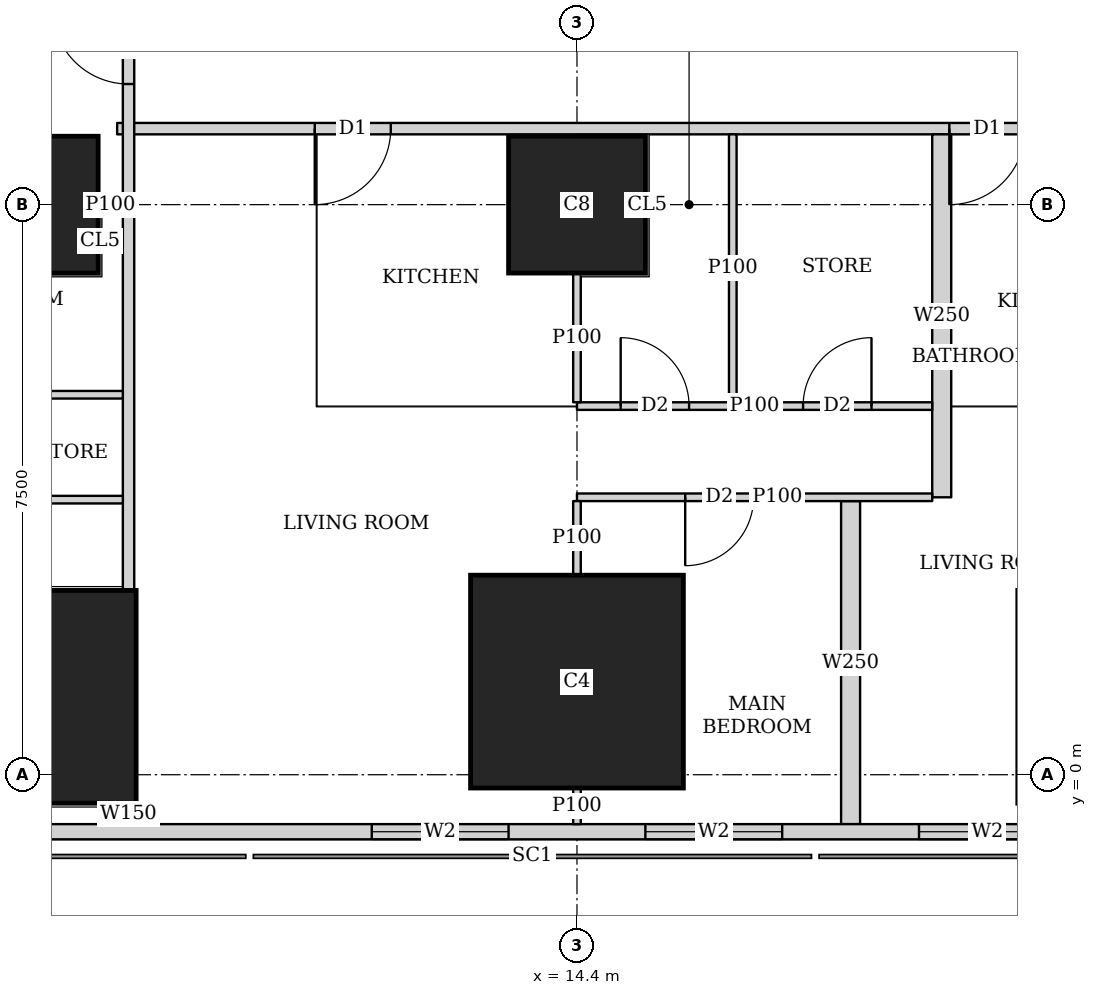
"""IFC4 building model, lengths in metres.
Left out: names, types, materials, properties, quantities, classifications, styles, units other than length and angle.
Written with IfcOpenShell. Run it as: python <this file> out.ifc"""

import sys

from ifc_helpers import new_model, si_unit, direction, frame, frame_2d, origin, origin_2d, place, context, subcontext, project, spatial, rectangle, extrude, element, fill, save


model = new_model("IFC4")
c1 = context("Model", 3, precision=1e-05, world=origin(), true_north=direction((0.0, 1.0)))
c2 = subcontext(c1, "Body", "Model", "MODEL_VIEW")
j1 = project(units=[si_unit("LENGTHUNIT", "METRE"), si_unit("PLANEANGLEUNIT", "RADIAN")], contexts=[c1])
p1 = place(None, origin())
s1 = spatial("IfcSite", under=j1, at=p1, CompositionType="ELEMENT")
p2 = place(p1, origin())
s2 = spatial("IfcBuilding", under=s1, at=p2, CompositionType="ELEMENT")
p3 = place(p2, frame((0.0, 0.0, 68.75)))
s3 = spatial("IfcBuildingStorey", under=s2, at=p3, CompositionType="ELEMENT", Elevation=68.75)
for number, where, z_axis, x_axis in (
    (1, (7.2, 1.025, 0.0), (0.0, 0.0, 1.0), (1.0, 0.0, 0.0)),
    (2, (14.4, 1.225, 0.0), (0.0, 0.0, 1.0), (1.0, 0.0, 0.0)),
):
    element("IfcColumn", number, at=place(p3, frame(where, z_axis=z_axis, x_axis=x_axis)), inside=s3, PredefinedType="COLUMN", context=c2, shape_type="SweptSolid", body=[
        extrude(rectangle(XDim=2.8, YDim=2.8, at=origin_2d()), origin(), (0.0, 0.0, 1.0), 3.75),
    ])
for number, where, z_axis, x_axis in (
    (3, (7.2, 7.5, 0.0), (0.0, 0.0, 1.0), (1.0, 0.0, 0.0)),
    (4, (14.4, 7.5, 0.0), (0.0, 0.0, 1.0), (1.0, 0.0, 0.0)),
):
    element("IfcColumn", number, at=place(p3, frame(where, z_axis=z_axis, x_axis=x_axis)), inside=s3, PredefinedType="COLUMN", context=c2, shape_type="SweptSolid", body=[
        extrude(rectangle(XDim=1.8, YDim=1.8, at=origin_2d()), origin(), (0.0, 0.0, 1.0), 3.75),
    ])
p4 = place(p3, frame((2.163, -0.75, 0.0), z_axis=(0.0, 0.0, 1.0), x_axis=(1.0, 0.0, 0.0)))
e5 = element("IfcWall", 5, at=p4, inside=s3, PredefinedType="SOLIDWALL", context=c2, shape_type="SweptSolid", body=[
    extrude(rectangle(XDim=45.628, YDim=0.2, at=frame_2d((22.814, 0.0))), origin(), (0.0, 0.0, 1.0), 3.45),
])
p5 = place(p4, frame((9.537, 0.0, 0.9)))
e6 = element("IfcOpeningElement", 6, at=p5, cuts=e5, PredefinedType="OPENING", context=c2, shape_type="SweptSolid", body=[
    extrude(rectangle(XDim=1.8, YDim=1.5, at=frame_2d((0.9, 0.75))), frame((0.0, 0.11, 0.0), z_axis=(0.0, -1.0, 0.0), x_axis=(1.0, 0.0, 0.0)), (0.0, 0.0, 1.0), 0.22),
])
p6 = place(p4, frame((13.137, 0.0, 0.9)))
e7 = element("IfcOpeningElement", 7, at=p6, cuts=e5, PredefinedType="OPENING", context=c2, shape_type="SweptSolid", body=[
    extrude(rectangle(XDim=1.8, YDim=1.5, at=frame_2d((0.9, 0.75))), frame((0.0, 0.11, 0.0), z_axis=(0.0, -1.0, 0.0), x_axis=(1.0, 0.0, 0.0)), (0.0, 0.0, 1.0), 0.22),
])
p7 = place(p4, frame((16.737, 0.0, 0.9)))
e8 = element("IfcOpeningElement", 8, at=p7, cuts=e5, PredefinedType="OPENING", context=c2, shape_type="SweptSolid", body=[
    extrude(rectangle(XDim=1.8, YDim=1.5, at=frame_2d((0.9, 0.75))), frame((0.0, 0.11, 0.0), z_axis=(0.0, -1.0, 0.0), x_axis=(1.0, 0.0, 0.0)), (0.0, 0.0, 1.0), 0.22),
])
p8 = place(p4, frame((20.337, 0.0, 0.9)))
e9 = element("IfcOpeningElement", 9, at=p8, cuts=e5, PredefinedType="OPENING", context=c2, shape_type="SweptSolid", body=[
    extrude(rectangle(XDim=1.8, YDim=1.5, at=frame_2d((0.9, 0.75))), frame((0.0, 0.11, 0.0), z_axis=(0.0, -1.0, 0.0), x_axis=(1.0, 0.0, 0.0)), (0.0, 0.0, 1.0), 0.22),
])
p9 = place(p4, frame((23.937, 0.0, 0.9)))
e10 = element("IfcOpeningElement", 10, at=p9, cuts=e5, PredefinedType="OPENING", context=c2, shape_type="SweptSolid", body=[
    extrude(rectangle(XDim=1.8, YDim=1.5, at=frame_2d((0.9, 0.75))), frame((0.0, 0.11, 0.0), z_axis=(0.0, -1.0, 0.0), x_axis=(1.0, 0.0, 0.0)), (0.0, 0.0, 1.0), 0.22),
])
p10 = place(p4, frame((27.537, 0.0, 0.9)))
e11 = element("IfcOpeningElement", 11, at=p10, cuts=e5, PredefinedType="OPENING", context=c2, shape_type="SweptSolid", body=[
    extrude(rectangle(XDim=1.8, YDim=1.5, at=frame_2d((0.9, 0.75))), frame((0.0, 0.11, 0.0), z_axis=(0.0, -1.0, 0.0), x_axis=(1.0, 0.0, 0.0)), (0.0, 0.0, 1.0), 0.22),
])
p11 = place(p4, frame((31.137, 0.0, 0.9)))
e12 = element("IfcOpeningElement", 12, at=p11, cuts=e5, PredefinedType="OPENING", context=c2, shape_type="SweptSolid", body=[
    extrude(rectangle(XDim=1.8, YDim=1.5, at=frame_2d((0.9, 0.75))), frame((0.0, 0.11, 0.0), z_axis=(0.0, -1.0, 0.0), x_axis=(1.0, 0.0, 0.0)), (0.0, 0.0, 1.0), 0.22),
])
p12 = place(p4, frame((34.737, 0.0, 0.9)))
e13 = element("IfcOpeningElement", 13, at=p12, cuts=e5, PredefinedType="OPENING", context=c2, shape_type="SweptSolid", body=[
    extrude(rectangle(XDim=1.8, YDim=1.5, at=frame_2d((0.9, 0.75))), frame((0.0, 0.11, 0.0), z_axis=(0.0, -1.0, 0.0), x_axis=(1.0, 0.0, 0.0)), (0.0, 0.0, 1.0), 0.22),
])
p13 = place(p3, frame((8.5, -0.65, 0.0), z_axis=(0.0, 0.0, 1.0), x_axis=(0.0, 1.0, 0.0)))
e14 = element("IfcWall", 14, at=p13, inside=s3, PredefinedType="SOLIDWALL", context=c2, shape_type="SweptSolid", body=[
    extrude(rectangle(XDim=0.274, YDim=0.15, at=frame_2d((0.137, 0.0))), origin(), (0.0, 0.0, 1.0), 3.45),
])
p14 = place(p3, frame((8.5, 2.426, 0.0), z_axis=(0.0, 0.0, 1.0), x_axis=(0.0, 1.0, 0.0)))
e15 = element("IfcWall", 15, at=p14, inside=s3, PredefinedType="SOLIDWALL", context=c2, shape_type="SweptSolid", body=[
    extrude(rectangle(XDim=40.173, YDim=0.15, at=frame_2d((20.086, 0.0))), origin(), (0.0, 0.0, 1.0), 3.45),
])
p15 = place(p14, frame((6.661, 0.0, 0.0)))
e16 = element("IfcOpeningElement", 16, at=p15, cuts=e15, PredefinedType="OPENING", context=c2, shape_type="SweptSolid", body=[
    extrude(rectangle(XDim=1.0, YDim=2.1, at=frame_2d((0.5, 1.05))), frame((0.0, 0.085, 0.0), z_axis=(0.0, -1.0, 0.0), x_axis=(1.0, 0.0, 0.0)), (0.0, 0.0, 1.0), 0.17),
])
p16 = place(p14, frame((9.986, 0.0, 0.0)))
e17 = element("IfcOpeningElement", 17, at=p16, cuts=e15, PredefinedType="OPENING", context=c2, shape_type="SweptSolid", body=[
    extrude(rectangle(XDim=1.0, YDim=2.1, at=frame_2d((0.5, 1.05))), frame((0.0, 0.085, 0.0), z_axis=(0.0, -1.0, 0.0), x_axis=(1.0, 0.0, 0.0)), (0.0, 0.0, 1.0), 0.17),
])
p17 = place(p14, frame((17.487, 0.0, 0.0)))
e18 = element("IfcOpeningElement", 18, at=p17, cuts=e15, PredefinedType="OPENING", context=c2, shape_type="SweptSolid", body=[
    extrude(rectangle(XDim=1.0, YDim=2.1, at=frame_2d((0.5, 1.05))), frame((0.0, 0.085, 0.0), z_axis=(0.0, -1.0, 0.0), x_axis=(1.0, 0.0, 0.0)), (0.0, 0.0, 1.0), 0.17),
])
p18 = place(p14, frame((24.987, 0.0, 0.0)))
e19 = element("IfcOpeningElement", 19, at=p18, cuts=e15, PredefinedType="OPENING", context=c2, shape_type="SweptSolid", body=[
    extrude(rectangle(XDim=1.0, YDim=2.1, at=frame_2d((0.5, 1.05))), frame((0.0, 0.085, 0.0), z_axis=(0.0, -1.0, 0.0), x_axis=(1.0, 0.0, 0.0)), (0.0, 0.0, 1.0), 0.17),
])
p19 = place(p3, frame((40.054, 8.5, 0.0), z_axis=(0.0, 0.0, 1.0), x_axis=(-1.0, 0.0, 0.0)))
e20 = element("IfcWall", 20, at=p19, inside=s3, PredefinedType="SOLIDWALL", context=c2, shape_type="SweptSolid", body=[
    extrude(rectangle(XDim=31.704, YDim=0.15, at=frame_2d((15.852, 0.0))), origin(), (0.0, 0.0, 1.0), 3.45),
])
p20 = place(p19, frame((28.104, 0.0, 0.0)))
e21 = element("IfcOpeningElement", 21, at=p20, cuts=e20, PredefinedType="OPENING", context=c2, shape_type="SweptSolid", body=[
    extrude(rectangle(XDim=1.0, YDim=2.1, at=frame_2d((0.5, 1.05))), frame((0.0, 0.085, 0.0), z_axis=(0.0, -1.0, 0.0), x_axis=(1.0, 0.0, 0.0)), (0.0, 0.0, 1.0), 0.17),
])
p21 = place(p19, frame((19.755, 0.0, 0.0)))
e22 = element("IfcOpeningElement", 22, at=p21, cuts=e20, PredefinedType="OPENING", context=c2, shape_type="SweptSolid", body=[
    extrude(rectangle(XDim=1.0, YDim=2.1, at=frame_2d((0.5, 1.05))), frame((0.0, 0.085, 0.0), z_axis=(0.0, -1.0, 0.0), x_axis=(1.0, 0.0, 0.0)), (0.0, 0.0, 1.0), 0.17),
])
p22 = place(p19, frame((12.555, 0.0, 0.0)))
e23 = element("IfcOpeningElement", 23, at=p22, cuts=e20, PredefinedType="OPENING", context=c2, shape_type="SweptSolid", body=[
    extrude(rectangle(XDim=1.0, YDim=2.1, at=frame_2d((0.5, 1.05))), frame((0.0, 0.085, 0.0), z_axis=(0.0, -1.0, 0.0), x_axis=(1.0, 0.0, 0.0)), (0.0, 0.0, 1.0), 0.17),
])
p23 = place(p19, frame((5.355, 0.0, 0.0)))
e24 = element("IfcOpeningElement", 24, at=p23, cuts=e20, PredefinedType="OPENING", context=c2, shape_type="SweptSolid", body=[
    extrude(rectangle(XDim=1.0, YDim=2.1, at=frame_2d((0.5, 1.05))), frame((0.0, 0.085, 0.0), z_axis=(0.0, -1.0, 0.0), x_axis=(1.0, 0.0, 0.0)), (0.0, 0.0, 1.0), 0.17),
])
p24 = place(p3, frame((4.9, 4.999, 0.0), z_axis=(0.0, 0.0, 1.0), x_axis=(1.0, 0.0, 0.0)))
e25 = element("IfcWall", 25, at=p24, inside=s3, PredefinedType="PARTITIONING", context=c2, shape_type="SweptSolid", body=[
    extrude(rectangle(XDim=3.525, YDim=0.1, at=frame_2d((1.763, 0.0))), origin(), (0.0, 0.0, 1.0), 3.45),
])
p25 = place(p24, frame((1.325, 0.0, 0.0)))
e26 = element("IfcOpeningElement", 26, at=p25, cuts=e25, PredefinedType="OPENING", context=c2, shape_type="SweptSolid", body=[
    extrude(rectangle(XDim=0.9, YDim=2.1, at=frame_2d((0.45, 1.05))), frame((0.0, 0.06, 0.0), z_axis=(0.0, -1.0, 0.0), x_axis=(1.0, 0.0, 0.0)), (0.0, 0.0, 1.0), 0.12),
])
p26 = place(p3, frame((8.101, 7.5, 0.0), z_axis=(0.0, 0.0, 1.0), x_axis=(1.0, 0.0, 0.0)))
e27 = element("IfcWall", 27, at=p26, inside=s3, PredefinedType="PARTITIONING", context=c2, shape_type="SweptSolid", body=[
    extrude(rectangle(XDim=0.324, YDim=0.1, at=frame_2d((0.162, 0.0))), origin(), (0.0, 0.0, 1.0), 3.45),
])
p27 = place(p3, frame((19.074, 3.65, 0.0), z_axis=(0.0, 0.0, 1.0), x_axis=(-1.0, 0.0, 0.0)))
e28 = element("IfcWall", 28, at=p27, inside=s3, PredefinedType="PARTITIONING", context=c2, shape_type="SweptSolid", body=[
    extrude(rectangle(XDim=4.674, YDim=0.1, at=frame_2d((2.337, 0.0))), origin(), (0.0, 0.0, 1.0), 3.45),
])
p28 = place(p27, frame((2.35, 0.0, 0.0)))
e29 = element("IfcOpeningElement", 29, at=p28, cuts=e28, PredefinedType="OPENING", context=c2, shape_type="SweptSolid", body=[
    extrude(rectangle(XDim=0.9, YDim=2.1, at=frame_2d((0.45, 1.05))), frame((0.0, 0.06, 0.0), z_axis=(0.0, -1.0, 0.0), x_axis=(1.0, 0.0, 0.0)), (0.0, 0.0, 1.0), 0.12),
])
p29 = place(p3, frame((19.074, 4.85, 0.0), z_axis=(0.0, 0.0, 1.0), x_axis=(-1.0, 0.0, 0.0)))
e30 = element("IfcWall", 30, at=p29, inside=s3, PredefinedType="PARTITIONING", context=c2, shape_type="SweptSolid", body=[
    extrude(rectangle(XDim=4.674, YDim=0.1, at=frame_2d((2.337, 0.0))), origin(), (0.0, 0.0, 1.0), 3.45),
])
p30 = place(p29, frame((3.199, 0.0, 0.0)))
e31 = element("IfcOpeningElement", 31, at=p30, cuts=e30, PredefinedType="OPENING", context=c2, shape_type="SweptSolid", body=[
    extrude(rectangle(XDim=0.9, YDim=2.1, at=frame_2d((0.45, 1.05))), frame((0.0, 0.06, 0.0), z_axis=(0.0, -1.0, 0.0), x_axis=(1.0, 0.0, 0.0)), (0.0, 0.0, 1.0), 0.12),
])
p31 = place(p29, frame((0.799, 0.0, 0.0)))
e32 = element("IfcOpeningElement", 32, at=p31, cuts=e30, PredefinedType="OPENING", context=c2, shape_type="SweptSolid", body=[
    extrude(rectangle(XDim=0.9, YDim=2.1, at=frame_2d((0.45, 1.05))), frame((0.0, 0.06, 0.0), z_axis=(0.0, -1.0, 0.0), x_axis=(1.0, 0.0, 0.0)), (0.0, 0.0, 1.0), 0.12),
])
p32 = place(p3, frame((14.4, -0.65, 0.0), z_axis=(0.0, 0.0, 1.0), x_axis=(0.0, 1.0, 0.0)))
e33 = element("IfcWall", 33, at=p32, inside=s3, PredefinedType="PARTITIONING", context=c2, shape_type="SweptSolid", body=[
    extrude(rectangle(XDim=0.474, YDim=0.1, at=frame_2d((0.237, 0.0))), origin(), (0.0, 0.0, 1.0), 3.45),
])
p33 = place(p3, frame((14.4, 2.626, 0.0), z_axis=(0.0, 0.0, 1.0), x_axis=(0.0, 1.0, 0.0)))
e34 = element("IfcWall", 34, at=p33, inside=s3, PredefinedType="PARTITIONING", context=c2, shape_type="SweptSolid", body=[
    extrude(rectangle(XDim=0.974, YDim=0.1, at=frame_2d((0.487, 0.0))), origin(), (0.0, 0.0, 1.0), 3.45),
])
p34 = place(p3, frame((14.4, 4.9, 0.0), z_axis=(0.0, 0.0, 1.0), x_axis=(0.0, 1.0, 0.0)))
e35 = element("IfcWall", 35, at=p34, inside=s3, PredefinedType="PARTITIONING", context=c2, shape_type="SweptSolid", body=[
    extrude(rectangle(XDim=1.699, YDim=0.1, at=frame_2d((0.85, 0.0))), origin(), (0.0, 0.0, 1.0), 3.45),
])
p35 = place(p3, frame((16.45, 4.9, 0.0), z_axis=(0.0, 0.0, 1.0), x_axis=(0.0, 1.0, 0.0)))
e36 = element("IfcWall", 36, at=p35, inside=s3, PredefinedType="PARTITIONING", context=c2, shape_type="SweptSolid", body=[
    extrude(rectangle(XDim=3.525, YDim=0.1, at=frame_2d((1.763, 0.0))), origin(), (0.0, 0.0, 1.0), 3.45),
])
p36 = place(p3, frame((18.0, -0.65, 0.0), z_axis=(0.0, 0.0, 1.0), x_axis=(0.0, 1.0, 0.0)))
e37 = element("IfcWall", 37, at=p36, inside=s3, PredefinedType="SOLIDWALL", context=c2, shape_type="SweptSolid", body=[
    extrude(rectangle(XDim=4.25, YDim=0.25, at=frame_2d((2.125, 0.0))), origin(), (0.0, 0.0, 1.0), 2.0),
])
p37 = place(p3, frame((19.199, 3.65, 0.0), z_axis=(0.0, 0.0, 1.0), x_axis=(0.0, 1.0, 0.0)))
e38 = element("IfcWall", 38, at=p37, inside=s3, PredefinedType="SOLIDWALL", context=c2, shape_type="SweptSolid", body=[
    extrude(rectangle(XDim=4.775, YDim=0.25, at=frame_2d((2.388, 0.0))), origin(), (0.0, 0.0, 1.0), 3.45),
])
p38 = place(p3, frame((4.9, 3.619, 0.0), z_axis=(0.0, 0.0, 1.0), x_axis=(1.0, 0.0, 0.0)))
e39 = element("IfcWall", 39, at=p38, inside=s3, PredefinedType="PARTITIONING", context=c2, shape_type="SweptSolid", body=[
    extrude(rectangle(XDim=3.525, YDim=0.1, at=frame_2d((1.763, 0.0))), origin(), (0.0, 0.0, 1.0), 3.45),
])
p39 = place(p38, frame((0.15, 0.0, 0.0)))
e40 = element("IfcOpeningElement", 40, at=p39, cuts=e39, PredefinedType="OPENING", context=c2, shape_type="SweptSolid", body=[
    extrude(rectangle(XDim=0.9, YDim=2.1, at=frame_2d((0.45, 1.05))), frame((0.0, 0.06, 0.0), z_axis=(0.0, -1.0, 0.0), x_axis=(1.0, 0.0, 0.0)), (0.0, 0.0, 1.0), 0.12),
])
p40 = place(p5, origin())
e41 = element("IfcWindow", 41, at=p40, inside=s3, PartitioningType="SINGLE_PANEL", PredefinedType="WINDOW", context=c2, shape_type="SweptSolid", body=[
    extrude(rectangle(XDim=1.8, YDim=1.5, at=frame_2d((0.9, 0.75))), frame((0.0, 0.03, 0.0), z_axis=(0.0, -1.0, 0.0), x_axis=(1.0, 0.0, 0.0)), (0.0, 0.0, 1.0), 0.06),
])
fill(e6, e41)
p41 = place(p6, origin())
e42 = element("IfcWindow", 42, at=p41, inside=s3, PartitioningType="SINGLE_PANEL", PredefinedType="WINDOW", context=c2, shape_type="SweptSolid", body=[
    extrude(rectangle(XDim=1.8, YDim=1.5, at=frame_2d((0.9, 0.75))), frame((0.0, 0.03, 0.0), z_axis=(0.0, -1.0, 0.0), x_axis=(1.0, 0.0, 0.0)), (0.0, 0.0, 1.0), 0.06),
])
fill(e7, e42)
p42 = place(p7, origin())
e43 = element("IfcWindow", 43, at=p42, inside=s3, PartitioningType="SINGLE_PANEL", PredefinedType="WINDOW", context=c2, shape_type="SweptSolid", body=[
    extrude(rectangle(XDim=1.8, YDim=1.5, at=frame_2d((0.9, 0.75))), frame((0.0, 0.03, 0.0), z_axis=(0.0, -1.0, 0.0), x_axis=(1.0, 0.0, 0.0)), (0.0, 0.0, 1.0), 0.06),
])
fill(e8, e43)
p43 = place(p15, origin())
e44 = element("IfcDoor", 44, at=p43, inside=s3, OperationType="SINGLE_SWING_RIGHT", PredefinedType="DOOR", context=c2, shape_type="SweptSolid", body=[
    extrude(rectangle(XDim=1.0, YDim=2.1, at=frame_2d((0.5, 1.05))), frame((0.0, 0.025, 0.0), z_axis=(0.0, -1.0, 0.0), x_axis=(1.0, 0.0, 0.0)), (0.0, 0.0, 1.0), 0.05),
])
fill(e16, e44)
p44 = place(p28, origin())
e45 = element("IfcDoor", 45, at=p44, inside=s3, OperationType="SINGLE_SWING_RIGHT", PredefinedType="DOOR", context=c2, shape_type="SweptSolid", body=[
    extrude(rectangle(XDim=0.9, YDim=2.1, at=frame_2d((0.45, 1.05))), frame((0.0, 0.025, 0.0), z_axis=(0.0, -1.0, 0.0), x_axis=(1.0, 0.0, 0.0)), (0.0, 0.0, 1.0), 0.05),
])
fill(e29, e45)
p45 = place(p30, origin())
e46 = element("IfcDoor", 46, at=p45, inside=s3, OperationType="SINGLE_SWING_LEFT", PredefinedType="DOOR", context=c2, shape_type="SweptSolid", body=[
    extrude(rectangle(XDim=0.9, YDim=2.1, at=frame_2d((0.45, 1.05))), frame((0.0, 0.025, 0.0), z_axis=(0.0, -1.0, 0.0), x_axis=(1.0, 0.0, 0.0)), (0.0, 0.0, 1.0), 0.05),
])
fill(e31, e46)
p46 = place(p31, origin())
e47 = element("IfcDoor", 47, at=p46, inside=s3, OperationType="SINGLE_SWING_RIGHT", PredefinedType="DOOR", context=c2, shape_type="SweptSolid", body=[
    extrude(rectangle(XDim=0.9, YDim=2.1, at=frame_2d((0.45, 1.05))), frame((0.0, 0.025, 0.0), z_axis=(0.0, -1.0, 0.0), x_axis=(1.0, 0.0, 0.0)), (0.0, 0.0, 1.0), 0.05),
])
fill(e32, e47)
p47 = place(p20, origin())
e48 = element("IfcDoor", 48, at=p47, inside=s3, OperationType="SINGLE_SWING_RIGHT", PredefinedType="DOOR", context=c2, shape_type="SweptSolid", body=[
    extrude(rectangle(XDim=1.0, YDim=2.1, at=frame_2d((0.5, 1.05))), frame((0.0, 0.025, 0.0), z_axis=(0.0, -1.0, 0.0), x_axis=(1.0, 0.0, 0.0)), (0.0, 0.0, 1.0), 0.05),
])
fill(e21, e48)
p48 = place(p21, origin())
e49 = element("IfcDoor", 49, at=p48, inside=s3, OperationType="SINGLE_SWING_RIGHT", PredefinedType="DOOR", context=c2, shape_type="SweptSolid", body=[
    extrude(rectangle(XDim=1.0, YDim=2.1, at=frame_2d((0.5, 1.05))), frame((0.0, 0.025, 0.0), z_axis=(0.0, -1.0, 0.0), x_axis=(1.0, 0.0, 0.0)), (0.0, 0.0, 1.0), 0.05),
])
fill(e22, e49)
save(model, sys.argv[1])
